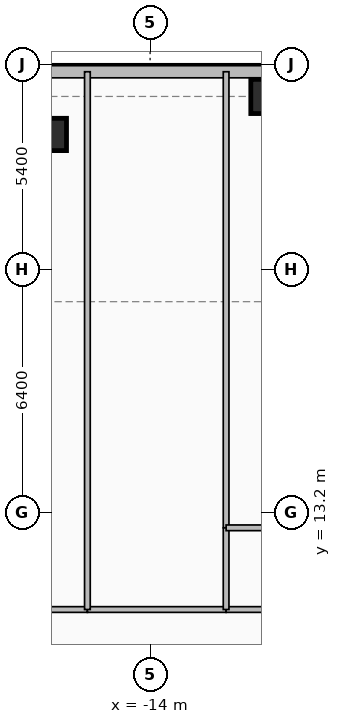
"""IFC4 building model, lengths in metres.
Left out: names, types, materials, properties, quantities, classifications, styles, units other than length and angle.
Written with IfcOpenShell. Run it as: python <this file> out.ifc"""

import sys

from ifc_helpers import new_model, si_unit, direction, frame, frame_2d, origin, origin_2d, place, context, subcontext, project, spatial, rectangle, extrude, element, fill, save


model = new_model("IFC4")
c1 = context("Model", 3, precision=1e-05, world=origin(), true_north=direction((0.0, 1.0)))
c2 = subcontext(c1, "Body", "Model", "MODEL_VIEW")
j1 = project(units=[si_unit("LENGTHUNIT", "METRE"), si_unit("PLANEANGLEUNIT", "RADIAN")], contexts=[c1])
p1 = place(None, origin())
s1 = spatial("IfcSite", under=j1, at=p1, CompositionType="ELEMENT")
p2 = place(p1, origin())
s2 = spatial("IfcBuilding", under=s1, at=p2, CompositionType="ELEMENT")
p3 = place(p2, frame((0.0, 0.0, 22.5)))
s3 = spatial("IfcBuildingStorey", under=s2, at=p3, CompositionType="ELEMENT", Elevation=22.5)
p4 = place(p3, frame((-11.0, 24.15, 0.0), z_axis=(0.0, 0.0, 1.0), x_axis=(1.0, 0.0, 0.0)))
e1 = element("IfcColumn", 1, at=p4, inside=s3, PredefinedType="COLUMN", context=c2, shape_type="SweptSolid", body=[
    extrude(rectangle(XDim=0.7, YDim=0.9, at=origin_2d()), origin(), (0.0, 0.0, 1.0), 4.5),
])
p5 = place(p3, frame((-16.5, 23.15, 0.0), z_axis=(0.0, 0.0, 1.0), x_axis=(1.0, 0.0, 0.0)))
e2 = element("IfcColumn", 2, at=p5, inside=s3, PredefinedType="PILASTER", context=c2, shape_type="SweptSolid", body=[
    extrude(rectangle(XDim=0.6, YDim=0.85, at=origin_2d()), origin(), (0.0, 0.0, 1.0), 4.5),
])
p6 = place(p3, frame((-36.8, 24.8, 0.0), z_axis=(0.0, 0.0, 1.0), x_axis=(1.0, 0.0, 0.0)))
e3 = element("IfcWall", 3, at=p6, inside=s3, PredefinedType="SOLIDWALL", context=c2, shape_type="SweptSolid", body=[
    extrude(rectangle(XDim=73.6, YDim=0.32, at=frame_2d((36.8, 0.0))), origin(), (0.0, 0.0, 1.0), 4.16),
])
p7 = place(p6, frame((1.079, 0.0, 0.85)))
e4 = element("IfcOpeningElement", 4, at=p7, cuts=e3, PredefinedType="OPENING", context=c2, shape_type="SweptSolid", body=[
    extrude(rectangle(XDim=2.3, YDim=2.4, at=frame_2d((1.15, 1.2))), frame((0.0, 0.17, 0.0), z_axis=(0.0, -1.0, 0.0), x_axis=(1.0, 0.0, 0.0)), (0.0, 0.0, 1.0), 0.34),
])
p8 = place(p6, frame((8.431, 0.0, 0.85)))
e5 = element("IfcOpeningElement", 5, at=p8, cuts=e3, PredefinedType="OPENING", context=c2, shape_type="SweptSolid", body=[
    extrude(rectangle(XDim=2.6, YDim=2.4, at=frame_2d((1.3, 1.2))), frame((0.0, 0.17, 0.0), z_axis=(0.0, -1.0, 0.0), x_axis=(1.0, 0.0, 0.0)), (0.0, 0.0, 1.0), 0.34),
])
p9 = place(p6, frame((13.316, 0.0, 0.85)))
e6 = element("IfcOpeningElement", 6, at=p9, cuts=e3, PredefinedType="OPENING", context=c2, shape_type="SweptSolid", body=[
    extrude(rectangle(XDim=1.1, YDim=1.85, at=frame_2d((0.55, 0.925))), frame((0.0, 0.17, 0.0), z_axis=(0.0, -1.0, 0.0), x_axis=(1.0, 0.0, 0.0)), (0.0, 0.0, 1.0), 0.34),
])
p10 = place(p6, frame((16.339, 0.0, 0.85)))
e7 = element("IfcOpeningElement", 7, at=p10, cuts=e3, PredefinedType="OPENING", context=c2, shape_type="SweptSolid", body=[
    extrude(rectangle(XDim=2.0, YDim=2.4, at=frame_2d((1.0, 1.2))), frame((0.0, 0.17, 0.0), z_axis=(0.0, -1.0, 0.0), x_axis=(1.0, 0.0, 0.0)), (0.0, 0.0, 1.0), 0.34),
])
p11 = place(p6, frame((21.875, 0.0, 0.85)))
e8 = element("IfcOpeningElement", 8, at=p11, cuts=e3, PredefinedType="OPENING", context=c2, shape_type="SweptSolid", body=[
    extrude(rectangle(XDim=2.3, YDim=2.4, at=frame_2d((1.15, 1.2))), frame((0.0, 0.17, 0.0), z_axis=(0.0, -1.0, 0.0), x_axis=(1.0, 0.0, 0.0)), (0.0, 0.0, 1.0), 0.34),
])
p12 = place(p6, frame((26.53, 0.0, 0.85)))
e9 = element("IfcOpeningElement", 9, at=p12, cuts=e3, PredefinedType="OPENING", context=c2, shape_type="SweptSolid", body=[
    extrude(rectangle(XDim=2.6, YDim=2.4, at=frame_2d((1.3, 1.2))), frame((0.0, 0.17, 0.0), z_axis=(0.0, -1.0, 0.0), x_axis=(1.0, 0.0, 0.0)), (0.0, 0.0, 1.0), 0.34),
])
p13 = place(p6, frame((32.537, 0.0, 0.85)))
e10 = element("IfcOpeningElement", 10, at=p13, cuts=e3, PredefinedType="OPENING", context=c2, shape_type="SweptSolid", body=[
    extrude(rectangle(XDim=2.6, YDim=2.4, at=frame_2d((1.3, 1.2))), frame((0.0, 0.17, 0.0), z_axis=(0.0, -1.0, 0.0), x_axis=(1.0, 0.0, 0.0)), (0.0, 0.0, 1.0), 0.34),
])
p14 = place(p6, frame((38.543, 0.0, 0.85)))
e11 = element("IfcOpeningElement", 11, at=p14, cuts=e3, PredefinedType="OPENING", context=c2, shape_type="SweptSolid", body=[
    extrude(rectangle(XDim=2.6, YDim=2.4, at=frame_2d((1.3, 1.2))), frame((0.0, 0.17, 0.0), z_axis=(0.0, -1.0, 0.0), x_axis=(1.0, 0.0, 0.0)), (0.0, 0.0, 1.0), 0.34),
])
p15 = place(p6, frame((44.55, 0.0, 0.85)))
e12 = element("IfcOpeningElement", 12, at=p15, cuts=e3, PredefinedType="OPENING", context=c2, shape_type="SweptSolid", body=[
    extrude(rectangle(XDim=2.6, YDim=2.4, at=frame_2d((1.3, 1.2))), frame((0.0, 0.17, 0.0), z_axis=(0.0, -1.0, 0.0), x_axis=(1.0, 0.0, 0.0)), (0.0, 0.0, 1.0), 0.34),
])
p16 = place(p6, frame((50.556, 0.0, 0.85)))
e13 = element("IfcOpeningElement", 13, at=p16, cuts=e3, PredefinedType="OPENING", context=c2, shape_type="SweptSolid", body=[
    extrude(rectangle(XDim=2.6, YDim=2.4, at=frame_2d((1.3, 1.2))), frame((0.0, 0.17, 0.0), z_axis=(0.0, -1.0, 0.0), x_axis=(1.0, 0.0, 0.0)), (0.0, 0.0, 1.0), 0.34),
])
p17 = place(p6, frame((55.341, 0.0, 0.85)))
e14 = element("IfcOpeningElement", 14, at=p17, cuts=e3, PredefinedType="OPENING", context=c2, shape_type="SweptSolid", body=[
    extrude(rectangle(XDim=2.0, YDim=2.4, at=frame_2d((1.0, 1.2))), frame((0.0, 0.17, 0.0), z_axis=(0.0, -1.0, 0.0), x_axis=(1.0, 0.0, 0.0)), (0.0, 0.0, 1.0), 0.34),
])
p18 = place(p6, frame((59.16, 0.0, 0.85)))
e15 = element("IfcOpeningElement", 15, at=p18, cuts=e3, PredefinedType="OPENING", context=c2, shape_type="SweptSolid", body=[
    extrude(rectangle(XDim=1.1, YDim=1.85, at=frame_2d((0.55, 0.925))), frame((0.0, 0.17, 0.0), z_axis=(0.0, -1.0, 0.0), x_axis=(1.0, 0.0, 0.0)), (0.0, 0.0, 1.0), 0.34),
])
p19 = place(p6, frame((62.649, 0.0, 0.85)))
e16 = element("IfcOpeningElement", 16, at=p19, cuts=e3, PredefinedType="OPENING", context=c2, shape_type="SweptSolid", body=[
    extrude(rectangle(XDim=2.6, YDim=2.4, at=frame_2d((1.3, 1.2))), frame((0.0, 0.17, 0.0), z_axis=(0.0, -1.0, 0.0), x_axis=(1.0, 0.0, 0.0)), (0.0, 0.0, 1.0), 0.34),
])
p20 = place(p6, frame((70.301, 0.0, 0.85)))
e17 = element("IfcOpeningElement", 17, at=p20, cuts=e3, PredefinedType="OPENING", context=c2, shape_type="SweptSolid", body=[
    extrude(rectangle(XDim=2.3, YDim=2.4, at=frame_2d((1.15, 1.2))), frame((0.0, 0.17, 0.0), z_axis=(0.0, -1.0, 0.0), x_axis=(1.0, 0.0, 0.0)), (0.0, 0.0, 1.0), 0.34),
])
p21 = place(p3, frame((-18.0, 10.65, 0.0), z_axis=(0.0, 0.0, 1.0), x_axis=(1.0, 0.0, 0.0)))
e18 = element("IfcWall", 18, at=p21, inside=s3, PredefinedType="PLUMBINGWALL", context=c2, shape_type="SweptSolid", body=[
    extrude(rectangle(XDim=2.35, YDim=0.15, at=frame_2d((1.175, 0.0))), origin(), (0.0, 0.0, 1.0), 4.16),
])
p22 = place(p21, frame((0.834, 0.0, 0.0)))
e19 = element("IfcOpeningElement", 19, at=p22, cuts=e18, PredefinedType="OPENING", context=c2, shape_type="SweptSolid", body=[
    extrude(rectangle(XDim=0.9, YDim=2.1, at=frame_2d((0.45, 1.05))), frame((0.0, 0.085, 0.0), z_axis=(0.0, -1.0, 0.0), x_axis=(1.0, 0.0, 0.0)), (0.0, 0.0, 1.0), 0.17),
])
p23 = place(p3, frame((-15.65, 10.65, 0.0), z_axis=(0.0, 0.0, 1.0), x_axis=(1.0, 0.0, 0.0)))
e20 = element("IfcWall", 20, at=p23, inside=s3, PredefinedType="PARTITIONING", context=c2, shape_type="SweptSolid", body=[
    extrude(rectangle(XDim=3.65, YDim=0.15, at=frame_2d((1.825, 0.0))), origin(), (0.0, 0.0, 1.0), 4.16),
])
p24 = place(p23, frame((1.157, 0.0, 0.0)))
e21 = element("IfcOpeningElement", 21, at=p24, cuts=e20, PredefinedType="OPENING", context=c2, shape_type="SweptSolid", body=[
    extrude(rectangle(XDim=0.95, YDim=2.1, at=frame_2d((0.475, 1.05))), frame((0.0, 0.085, 0.0), z_axis=(0.0, -1.0, 0.0), x_axis=(1.0, 0.0, 0.0)), (0.0, 0.0, 1.0), 0.17),
])
p25 = place(p3, frame((-12.0, 10.65, 0.0), z_axis=(0.0, 0.0, 1.0), x_axis=(1.0, 0.0, 0.0)))
e22 = element("IfcWall", 22, at=p25, inside=s3, PredefinedType="PLUMBINGWALL", context=c2, shape_type="SweptSolid", body=[
    extrude(rectangle(XDim=2.45, YDim=0.15, at=frame_2d((1.225, 0.0))), origin(), (0.0, 0.0, 1.0), 4.16),
])
p26 = place(p3, frame((-15.65, 24.8, 0.0), z_axis=(0.0, 0.0, 1.0), x_axis=(0.0, -1.0, 0.0)))
e23 = element("IfcWall", 23, at=p26, inside=s3, PredefinedType="PLUMBINGWALL", context=c2, shape_type="SweptSolid", body=[
    extrude(rectangle(XDim=14.15, YDim=0.15, at=frame_2d((7.075, 0.0))), origin(), (0.0, 0.0, 1.0), 4.16),
])
p27 = place(p3, frame((-12.0, 24.8, 0.0), z_axis=(0.0, 0.0, 1.0), x_axis=(0.0, -1.0, 0.0)))
e24 = element("IfcWall", 24, at=p27, inside=s3, PredefinedType="PARTITIONING", context=c2, shape_type="SweptSolid", body=[
    extrude(rectangle(XDim=12.0, YDim=0.15, at=frame_2d((6.0, 0.0))), origin(), (0.0, 0.0, 1.0), 4.16),
])
p28 = place(p3, frame((-12.0, 12.8, 0.0), z_axis=(0.0, 0.0, 1.0), x_axis=(0.0, -1.0, 0.0)))
e25 = element("IfcWall", 25, at=p28, inside=s3, PredefinedType="PLUMBINGWALL", context=c2, shape_type="SweptSolid", body=[
    extrude(rectangle(XDim=2.15, YDim=0.15, at=frame_2d((1.075, 0.0))), origin(), (0.0, 0.0, 1.0), 4.16),
])
p29 = place(p3, frame((-9.55, 12.8, 0.0), z_axis=(0.0, 0.0, 1.0), x_axis=(-1.0, 0.0, 0.0)))
e26 = element("IfcWall", 26, at=p29, inside=s3, PredefinedType="PLUMBINGWALL", context=c2, shape_type="SweptSolid", body=[
    extrude(rectangle(XDim=2.45, YDim=0.15, at=frame_2d((1.225, 0.0))), origin(), (0.0, 0.0, 1.0), 4.16),
])
p30 = place(p29, frame((0.921, 0.0, 0.0)))
e27 = element("IfcOpeningElement", 27, at=p30, cuts=e26, PredefinedType="OPENING", context=c2, shape_type="SweptSolid", body=[
    extrude(rectangle(XDim=0.9, YDim=2.1, at=frame_2d((0.45, 1.05))), frame((0.0, 0.085, 0.0), z_axis=(0.0, -1.0, 0.0), x_axis=(1.0, 0.0, 0.0)), (0.0, 0.0, 1.0), 0.17),
])
p31 = place(p11, origin())
e28 = element("IfcWindow", 28, at=p31, inside=s3, PartitioningType="SINGLE_PANEL", PredefinedType="WINDOW", context=c2, shape_type="SweptSolid", body=[
    extrude(rectangle(XDim=2.3, YDim=2.4, at=frame_2d((1.15, 1.2))), frame((0.0, 0.03, 0.0), z_axis=(0.0, -1.0, 0.0), x_axis=(1.0, 0.0, 0.0)), (0.0, 0.0, 1.0), 0.06),
])
fill(e8, e28)
p32 = place(p22, origin())
e29 = element("IfcDoor", 29, at=p32, inside=s3, OperationType="SINGLE_SWING_LEFT", PredefinedType="DOOR", context=c2, shape_type="SweptSolid", body=[
    extrude(rectangle(XDim=0.9, YDim=2.1, at=frame_2d((0.45, 1.05))), frame((0.0, 0.025, 0.0), z_axis=(0.0, -1.0, 0.0), x_axis=(1.0, 0.0, 0.0)), (0.0, 0.0, 1.0), 0.05),
])
fill(e19, e29)
p33 = place(p24, origin())
e30 = element("IfcDoor", 30, at=p33, inside=s3, OperationType="SINGLE_SWING_RIGHT", PredefinedType="DOOR", context=c2, shape_type="SweptSolid", body=[
    extrude(rectangle(XDim=0.95, YDim=2.1, at=frame_2d((0.475, 1.05))), frame((0.0, 0.025, 0.0), z_axis=(0.0, -1.0, 0.0), x_axis=(1.0, 0.0, 0.0)), (0.0, 0.0, 1.0), 0.05),
])
fill(e21, e30)
p34 = place(p30, origin())
e31 = element("IfcDoor", 31, at=p34, inside=s3, OperationType="SINGLE_SWING_RIGHT", PredefinedType="DOOR", context=c2, shape_type="SweptSolid", body=[
    extrude(rectangle(XDim=0.9, YDim=2.1, at=frame_2d((0.45, 1.05))), frame((0.0, 0.025, 0.0), z_axis=(0.0, -1.0, 0.0), x_axis=(1.0, 0.0, 0.0)), (0.0, 0.0, 1.0), 0.05),
])
fill(e27, e31)
save(model, sys.argv[1])
